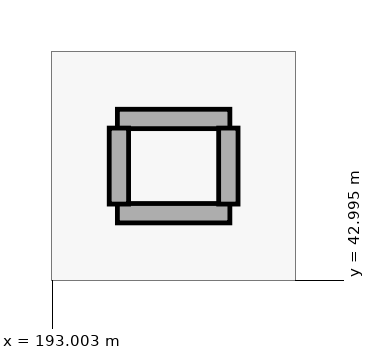
"""IFC4 building model, lengths in metres.
Left out: names, types, materials, properties, quantities, classifications, styles, units other than length and angle.
Written with IfcOpenShell. Run it as: python <this file> out.ifc"""

import sys

from ifc_helpers import new_model, si_unit, direction, frame, frame_2d, origin, place, context, subcontext, project, spatial, rectangle, extrude, element, save


model = new_model("IFC4")
c1 = context("Model", 3, precision=1e-05, world=origin(), true_north=direction((0.0, 1.0)))
c2 = subcontext(c1, "Body", "Model", "MODEL_VIEW")
j1 = project(units=[si_unit("LENGTHUNIT", "METRE"), si_unit("PLANEANGLEUNIT", "RADIAN")], contexts=[c1])
p1 = place(None, origin())
s1 = spatial("IfcSite", under=j1, at=p1, CompositionType="ELEMENT")
p2 = place(p1, origin())
s2 = spatial("IfcBuilding", under=s1, at=p2, CompositionType="ELEMENT")
p3 = place(p2, origin())
s3 = spatial("IfcBuildingStorey", under=s2, at=p3, CompositionType="ELEMENT", Elevation=0.0)
for number, where, z_axis, x_axis in (
    (1, (193.86, 45.12, 0.0), (0.0, 0.0, 1.0), (1.0, 0.0, 0.0)),
    (2, (193.86, 43.88, 0.0), (0.0, 0.0, 1.0), (1.0, 0.0, 0.0)),
):
    element("IfcWall", number, at=place(p3, frame(where, z_axis=z_axis, x_axis=x_axis)), inside=s3, PredefinedType="PARTITIONING", context=c2, shape_type="SweptSolid", body=[
        extrude(rectangle(XDim=1.48, YDim=0.255, at=frame_2d((0.74, 0.0))), origin(), (0.0, 0.0, 1.0), 5.04),
    ])
for number, where, z_axis, x_axis in (
    (3, (193.88, 44.0, 0.0), (0.0, 0.0, 1.0), (0.0, 1.0, 0.0)),
    (4, (195.32, 44.0, 0.0), (0.0, 0.0, 1.0), (0.0, 1.0, 0.0)),
):
    element("IfcWall", number, at=place(p3, frame(where, z_axis=z_axis, x_axis=x_axis)), inside=s3, PredefinedType="PARTITIONING", context=c2, shape_type="SweptSolid", body=[
        extrude(rectangle(XDim=1.0, YDim=0.255, at=frame_2d((0.5, 0.0))), origin(), (0.0, 0.0, 1.0), 5.04),
    ])
save(model, sys.argv[1])
